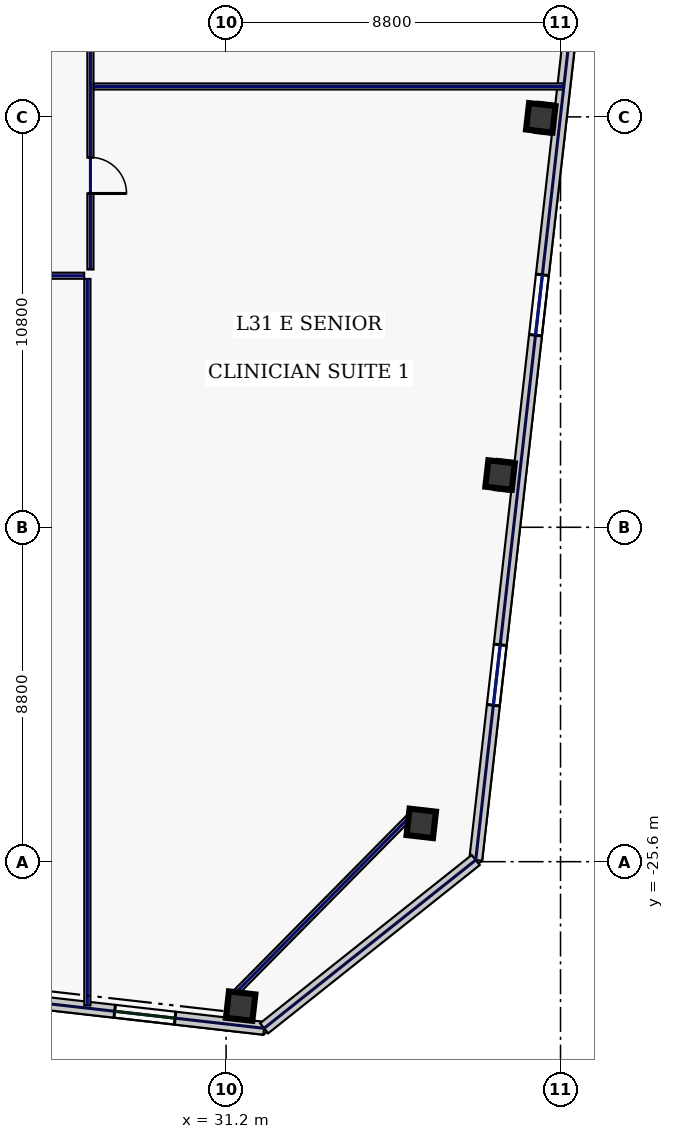
"""IFC4 building model, lengths in metres.
Left out: names, types, materials, properties, quantities, classifications, styles, units other than length and angle.
Written with IfcOpenShell. Run it as: python <this file> out.ifc"""

import sys

from ifc_helpers import new_model, si_unit, direction, frame, frame_2d, origin, origin_2d, place, context, subcontext, project, spatial, rectangle, hollow_rectangle, extrude, element, fill, save


model = new_model("IFC4")
c1 = context("Model", 3, precision=1e-05, world=origin(), true_north=direction((0.0, 1.0)))
c2 = subcontext(c1, "Body", "Model", "MODEL_VIEW")
j1 = project(units=[si_unit("LENGTHUNIT", "METRE"), si_unit("PLANEANGLEUNIT", "RADIAN")], contexts=[c1])
p1 = place(None, origin())
s1 = spatial("IfcSite", under=j1, at=p1, CompositionType="ELEMENT")
p2 = place(p1, origin())
s2 = spatial("IfcBuilding", under=s1, at=p2, CompositionType="ELEMENT")
p3 = place(p2, frame((0.0, 0.0, 137.4)))
s3 = spatial("IfcBuildingStorey", under=s2, at=p3, CompositionType="ELEMENT", Elevation=137.4)
for number, where, z_axis, x_axis in (
    (1, (31.583, -29.401, 0.0), (0.0, 0.0, 1.0), (0.994, -0.113, 0.0)),
    (2, (36.336, -24.592, 0.0), (0.0, 0.0, 1.0), (0.994, -0.113, 0.0)),
    (3, (38.409, -15.424, 0.0), (0.0, 0.0, 1.0), (0.994, -0.113, 0.0)),
    (4, (39.48, -6.025, 0.0), (0.0, 0.0, 1.0), (0.994, -0.113, 0.0)),
):
    element("IfcColumn", number, at=place(p3, frame(where, z_axis=z_axis, x_axis=x_axis)), inside=s3, PredefinedType="COLUMN", context=c2, shape_type="SweptSolid", body=[
        extrude(hollow_rectangle(XDim=0.7, YDim=0.7, WallThickness=0.032, at=origin_2d()), origin(), (0.0, 0.0, 1.0), 3.74),
    ])
p4 = place(p3, frame((11.115, -27.582, 0.0), z_axis=(0.0, 0.0, 1.0), x_axis=(0.993572655904, -0.113196190044, 0.0)))
e5 = element("IfcWall", 5, at=p4, inside=s3, PredefinedType="STANDARD", context=c2, shape_type="SweptSolid", body=[
    extrude(rectangle(XDim=21.223, YDim=0.34, at=frame_2d((10.611, 0.0))), origin(), (0.0, 0.0, 1.0), 3.74),
])
p5 = place(p4, frame((3.616, 0.0, 0.67)))
e6 = element("IfcOpeningElement", 6, at=p5, cuts=e5, PredefinedType="OPENING", context=c2, shape_type="SweptSolid", body=[
    extrude(rectangle(XDim=2.1, YDim=2.2, at=frame_2d((1.05, 1.1))), frame((0.0, 0.18, 0.0), z_axis=(0.0, -1.0, 0.0), x_axis=(1.0, 0.0, 0.0)), (0.0, 0.0, 1.0), 0.36),
])
p6 = place(p4, frame((7.838, 0.0, 0.67)))
e7 = element("IfcOpeningElement", 7, at=p6, cuts=e5, PredefinedType="OPENING", context=c2, shape_type="SweptSolid", body=[
    extrude(rectangle(XDim=2.1, YDim=2.2, at=frame_2d((1.05, 1.1))), frame((0.0, 0.18, 0.0), z_axis=(0.0, -1.0, 0.0), x_axis=(1.0, 0.0, 0.0)), (0.0, 0.0, 1.0), 0.36),
])
p7 = place(p4, frame((12.794, 0.0, 0.67)))
e8 = element("IfcOpeningElement", 8, at=p7, cuts=e5, PredefinedType="OPENING", context=c2, shape_type="SweptSolid", body=[
    extrude(rectangle(XDim=2.1, YDim=2.2, at=frame_2d((1.05, 1.1))), frame((0.0, 0.18, 0.0), z_axis=(0.0, -1.0, 0.0), x_axis=(1.0, 0.0, 0.0)), (0.0, 0.0, 1.0), 0.36),
])
p8 = place(p4, frame((17.265, 0.0, 0.22)))
e9 = element("IfcOpeningElement", 9, at=p8, cuts=e5, PredefinedType="OPENING", context=c2, shape_type="SweptSolid", body=[
    extrude(rectangle(XDim=1.6, YDim=1.2, at=frame_2d((0.8, 0.6))), frame((0.0, 0.18, 0.0), z_axis=(0.0, -1.0, 0.0), x_axis=(1.0, 0.0, 0.0)), (0.0, 0.0, 1.0), 0.36),
])
p9 = place(p3, frame((37.768, -25.556, 0.0), z_axis=(0.0, 0.0, 1.0), x_axis=(0.113201605824, 0.993572038877, 0.0)))
e10 = element("IfcWall", 10, at=p9, inside=s3, PredefinedType="STANDARD", context=c2, shape_type="SweptSolid", body=[
    extrude(rectangle(XDim=39.2, YDim=0.34, at=frame_2d((19.6, 0.0))), origin(), (0.0, 0.0, 1.0), 3.74),
])
p10 = place(p9, frame((4.1, 0.0, 0.58)))
e11 = element("IfcOpeningElement", 11, at=p10, cuts=e10, PredefinedType="OPENING", context=c2, shape_type="SweptSolid", body=[
    extrude(rectangle(XDim=1.6, YDim=2.3, at=frame_2d((0.8, 1.15))), frame((0.0, 0.18, 0.0), z_axis=(0.0, -1.0, 0.0), x_axis=(1.0, 0.0, 0.0)), (0.0, 0.0, 1.0), 0.36),
])
p11 = place(p9, frame((13.9, 0.0, 0.58)))
e12 = element("IfcOpeningElement", 12, at=p11, cuts=e10, PredefinedType="OPENING", context=c2, shape_type="SweptSolid", body=[
    extrude(rectangle(XDim=1.6, YDim=2.3, at=frame_2d((0.8, 1.15))), frame((0.0, 0.18, 0.0), z_axis=(0.0, -1.0, 0.0), x_axis=(1.0, 0.0, 0.0)), (0.0, 0.0, 1.0), 0.36),
])
p12 = place(p9, frame((23.35, 0.0, 0.75)))
e13 = element("IfcOpeningElement", 13, at=p12, cuts=e10, PredefinedType="OPENING", context=c2, shape_type="SweptSolid", body=[
    extrude(rectangle(XDim=0.85, YDim=1.85, at=frame_2d((0.425, 0.925))), frame((0.0, 0.18, 0.0), z_axis=(0.0, -1.0, 0.0), x_axis=(1.0, 0.0, 0.0)), (0.0, 0.0, 1.0), 0.36),
])
p13 = place(p9, frame((33.5, 0.0, 0.58)))
e14 = element("IfcOpeningElement", 14, at=p13, cuts=e10, PredefinedType="OPENING", context=c2, shape_type="SweptSolid", body=[
    extrude(rectangle(XDim=1.6, YDim=2.3, at=frame_2d((0.8, 1.15))), frame((0.0, 0.18, 0.0), z_axis=(0.0, -1.0, 0.0), x_axis=(1.0, 0.0, 0.0)), (0.0, 0.0, 1.0), 0.36),
])
p14 = place(p3, frame((32.201, -29.985, 0.0), z_axis=(0.0, 0.0, 1.0), x_axis=(0.78261359446, 0.622507800567, 0.0)))
e15 = element("IfcWall", 15, at=p14, inside=s3, PredefinedType="STANDARD", context=c2, shape_type="SweptSolid", body=[
    extrude(rectangle(XDim=7.114, YDim=0.34, at=frame_2d((3.557, 0.0))), origin(), (0.0, 0.0, 1.0), 3.74),
])
p15 = place(p3, frame((31.341, -29.162, 0.0), z_axis=(0.0, 0.0, 1.0), x_axis=(0.702905898933, 0.711282853192, 0.0)))
e16 = element("IfcWall", 16, at=p15, inside=s3, PredefinedType="PARTITIONING", context=c2, shape_type="SweptSolid", body=[
    extrude(rectangle(XDim=6.761, YDim=0.16, at=frame_2d((3.381, 0.0))), origin(), (0.0, 0.0, 1.0), 3.74),
])
p16 = place(p3, frame((27.63, 10.115, 0.0), z_axis=(0.0, 0.0, 1.0), x_axis=(0.0, -1.0, 0.0)))
e17 = element("IfcWall", 17, at=p16, inside=s3, PredefinedType="PARTITIONING", context=c2, shape_type="SweptSolid", body=[
    extrude(rectangle(XDim=20.13, YDim=0.16, at=frame_2d((10.065, 0.0))), origin(), (0.0, 0.0, 1.0), 3.74),
])
p17 = place(p16, frame((17.181, 0.0, 0.0)))
e18 = element("IfcOpeningElement", 18, at=p17, cuts=e17, PredefinedType="OPENING", context=c2, shape_type="SweptSolid", body=[
    extrude(rectangle(XDim=0.95, YDim=2.2, at=frame_2d((0.475, 1.1))), frame((0.0, 0.09, 0.0), z_axis=(0.0, -1.0, 0.0), x_axis=(1.0, 0.0, 0.0)), (0.0, 0.0, 1.0), 0.18),
])
p18 = place(p16, frame((12.325, 0.0, 0.0)))
e19 = element("IfcOpeningElement", 19, at=p18, cuts=e17, PredefinedType="OPENING", context=c2, shape_type="SweptSolid", body=[
    extrude(rectangle(XDim=0.95, YDim=2.2, at=frame_2d((0.475, 1.1))), frame((0.0, 0.09, 0.0), z_axis=(0.0, -1.0, 0.0), x_axis=(1.0, 0.0, 0.0)), (0.0, 0.0, 1.0), 0.18),
])
p19 = place(p16, frame((7.125, 0.0, 0.0)))
e20 = element("IfcOpeningElement", 20, at=p19, cuts=e17, PredefinedType="OPENING", context=c2, shape_type="SweptSolid", body=[
    extrude(rectangle(XDim=0.95, YDim=2.2, at=frame_2d((0.475, 1.1))), frame((0.0, 0.09, 0.0), z_axis=(0.0, -1.0, 0.0), x_axis=(1.0, 0.0, 0.0)), (0.0, 0.0, 1.0), 0.18),
])
p20 = place(p16, frame((2.219, 0.0, 0.0)))
e21 = element("IfcOpeningElement", 21, at=p20, cuts=e17, PredefinedType="OPENING", context=c2, shape_type="SweptSolid", body=[
    extrude(rectangle(XDim=0.95, YDim=2.2, at=frame_2d((0.475, 1.1))), frame((0.0, 0.09, 0.0), z_axis=(0.0, -1.0, 0.0), x_axis=(1.0, 0.0, 0.0)), (0.0, 0.0, 1.0), 0.18),
])
p21 = place(p3, frame((27.465, -10.18, 0.0), z_axis=(0.0, 0.0, 1.0), x_axis=(-1.0, 0.0, 0.0)))
e22 = element("IfcWall", 22, at=p21, inside=s3, PredefinedType="PARTITIONING", context=c2, shape_type="SweptSolid", body=[
    extrude(rectangle(XDim=54.93, YDim=0.16, at=frame_2d((27.465, 0.0))), origin(), (0.0, 0.0, 1.0), 3.74),
])
p22 = place(p21, frame((52.106, 0.0, 0.0)))
e23 = element("IfcOpeningElement", 23, at=p22, cuts=e22, PredefinedType="OPENING", context=c2, shape_type="SweptSolid", body=[
    extrude(rectangle(XDim=0.95, YDim=2.2, at=frame_2d((0.475, 1.1))), frame((0.0, 0.09, 0.0), z_axis=(0.0, -1.0, 0.0), x_axis=(1.0, 0.0, 0.0)), (0.0, 0.0, 1.0), 0.18),
])
p23 = place(p21, frame((47.05, 0.0, 0.0)))
e24 = element("IfcOpeningElement", 24, at=p23, cuts=e22, PredefinedType="OPENING", context=c2, shape_type="SweptSolid", body=[
    extrude(rectangle(XDim=0.95, YDim=2.2, at=frame_2d((0.475, 1.1))), frame((0.0, 0.09, 0.0), z_axis=(0.0, -1.0, 0.0), x_axis=(1.0, 0.0, 0.0)), (0.0, 0.0, 1.0), 0.18),
])
p24 = place(p21, frame((41.65, 0.0, 0.0)))
e25 = element("IfcOpeningElement", 25, at=p24, cuts=e22, PredefinedType="OPENING", context=c2, shape_type="SweptSolid", body=[
    extrude(rectangle(XDim=0.95, YDim=2.2, at=frame_2d((0.475, 1.1))), frame((0.0, 0.09, 0.0), z_axis=(0.0, -1.0, 0.0), x_axis=(1.0, 0.0, 0.0)), (0.0, 0.0, 1.0), 0.18),
])
p25 = place(p21, frame((35.825, 0.0, 0.0)))
e26 = element("IfcOpeningElement", 26, at=p25, cuts=e22, PredefinedType="OPENING", context=c2, shape_type="SweptSolid", body=[
    extrude(rectangle(XDim=0.95, YDim=2.2, at=frame_2d((0.475, 1.1))), frame((0.0, 0.09, 0.0), z_axis=(0.0, -1.0, 0.0), x_axis=(1.0, 0.0, 0.0)), (0.0, 0.0, 1.0), 0.18),
])
p26 = place(p21, frame((29.575, 0.0, 0.0)))
e27 = element("IfcOpeningElement", 27, at=p26, cuts=e22, PredefinedType="OPENING", context=c2, shape_type="SweptSolid", body=[
    extrude(rectangle(XDim=0.95, YDim=2.2, at=frame_2d((0.475, 1.1))), frame((0.0, 0.09, 0.0), z_axis=(0.0, -1.0, 0.0), x_axis=(1.0, 0.0, 0.0)), (0.0, 0.0, 1.0), 0.18),
])
p27 = place(p21, frame((23.285, 0.0, 0.0)))
e28 = element("IfcOpeningElement", 28, at=p27, cuts=e22, PredefinedType="OPENING", context=c2, shape_type="SweptSolid", body=[
    extrude(rectangle(XDim=0.95, YDim=2.2, at=frame_2d((0.475, 1.1))), frame((0.0, 0.09, 0.0), z_axis=(0.0, -1.0, 0.0), x_axis=(1.0, 0.0, 0.0)), (0.0, 0.0, 1.0), 0.18),
])
p28 = place(p21, frame((16.78, 0.0, 0.0)))
e29 = element("IfcOpeningElement", 29, at=p28, cuts=e22, PredefinedType="OPENING", context=c2, shape_type="SweptSolid", body=[
    extrude(rectangle(XDim=1.3, YDim=2.2, at=frame_2d((0.65, 1.1))), frame((0.0, 0.09, 0.0), z_axis=(0.0, -1.0, 0.0), x_axis=(1.0, 0.0, 0.0)), (0.0, 0.0, 1.0), 0.18),
])
p29 = place(p21, frame((11.23, 0.0, 0.0)))
e30 = element("IfcOpeningElement", 30, at=p29, cuts=e22, PredefinedType="OPENING", context=c2, shape_type="SweptSolid", body=[
    extrude(rectangle(XDim=1.3, YDim=2.2, at=frame_2d((0.65, 1.1))), frame((0.0, 0.09, 0.0), z_axis=(0.0, -1.0, 0.0), x_axis=(1.0, 0.0, 0.0)), (0.0, 0.0, 1.0), 0.18),
])
p30 = place(p21, frame((6.46, 0.0, 0.0)))
e31 = element("IfcOpeningElement", 31, at=p30, cuts=e22, PredefinedType="OPENING", context=c2, shape_type="SweptSolid", body=[
    extrude(rectangle(XDim=1.3, YDim=2.2, at=frame_2d((0.65, 1.1))), frame((0.0, 0.09, 0.0), z_axis=(0.0, -1.0, 0.0), x_axis=(1.0, 0.0, 0.0)), (0.0, 0.0, 1.0), 0.18),
])
p31 = place(p21, frame((2.194, 0.0, 0.0)))
e32 = element("IfcOpeningElement", 32, at=p31, cuts=e22, PredefinedType="OPENING", context=c2, shape_type="SweptSolid", body=[
    extrude(rectangle(XDim=0.95, YDim=2.2, at=frame_2d((0.475, 1.1))), frame((0.0, 0.09, 0.0), z_axis=(0.0, -1.0, 0.0), x_axis=(1.0, 0.0, 0.0)), (0.0, 0.0, 1.0), 0.18),
])
p32 = place(p3, frame((27.55, -29.385, 0.0), z_axis=(0.0, 0.0, 1.0), x_axis=(0.0, 1.0, 0.0)))
e33 = element("IfcWall", 33, at=p32, inside=s3, PredefinedType="PARTITIONING", context=c2, shape_type="SweptSolid", body=[
    extrude(rectangle(XDim=19.12, YDim=0.16, at=frame_2d((9.56, 0.0))), origin(), (0.0, 0.0, 1.0), 3.74),
])
p33 = place(p3, frame((27.715, -5.2, 0.0), z_axis=(0.0, 0.0, 1.0), x_axis=(1.0, 0.0, 0.0)))
e34 = element("IfcWall", 34, at=p33, inside=s3, PredefinedType="PARTITIONING", context=c2, shape_type="SweptSolid", body=[
    extrude(rectangle(XDim=12.352, YDim=0.16, at=frame_2d((6.176, 0.0))), origin(), (0.0, 0.0, 1.0), 3.74),
])
p34 = place(p8, origin())
e35 = element("IfcWindow", 35, at=p34, inside=s3, PartitioningType="SINGLE_PANEL", PredefinedType="WINDOW", context=c2, shape_type="SweptSolid", body=[
    extrude(rectangle(XDim=1.6, YDim=1.2, at=frame_2d((0.8, 0.6))), frame((0.0, 0.03, 0.0), z_axis=(0.0, -1.0, 0.0), x_axis=(1.0, 0.0, 0.0)), (0.0, 0.0, 1.0), 0.06),
])
fill(e9, e35)
p35 = place(p10, origin())
e36 = element("IfcWindow", 36, at=p35, inside=s3, PartitioningType="SINGLE_PANEL", PredefinedType="WINDOW", context=c2, shape_type="SweptSolid", body=[
    extrude(rectangle(XDim=1.6, YDim=2.3, at=frame_2d((0.8, 1.15))), frame((0.0, 0.03, 0.0), z_axis=(0.0, -1.0, 0.0), x_axis=(1.0, 0.0, 0.0)), (0.0, 0.0, 1.0), 0.06),
])
fill(e11, e36)
p36 = place(p11, origin())
e37 = element("IfcWindow", 37, at=p36, inside=s3, PartitioningType="SINGLE_PANEL", PredefinedType="WINDOW", context=c2, shape_type="SweptSolid", body=[
    extrude(rectangle(XDim=1.6, YDim=2.3, at=frame_2d((0.8, 1.15))), frame((0.0, 0.03, 0.0), z_axis=(0.0, -1.0, 0.0), x_axis=(1.0, 0.0, 0.0)), (0.0, 0.0, 1.0), 0.06),
])
fill(e12, e37)
p37 = place(p17, origin())
e38 = element("IfcDoor", 38, at=p37, inside=s3, OperationType="SINGLE_SWING_RIGHT", PredefinedType="DOOR", context=c2, shape_type="SweptSolid", body=[
    extrude(rectangle(XDim=0.95, YDim=2.2, at=frame_2d((0.475, 1.1))), frame((0.0, 0.025, 0.0), z_axis=(0.0, -1.0, 0.0), x_axis=(1.0, 0.0, 0.0)), (0.0, 0.0, 1.0), 0.05),
])
fill(e18, e38)
save(model, sys.argv[1])
